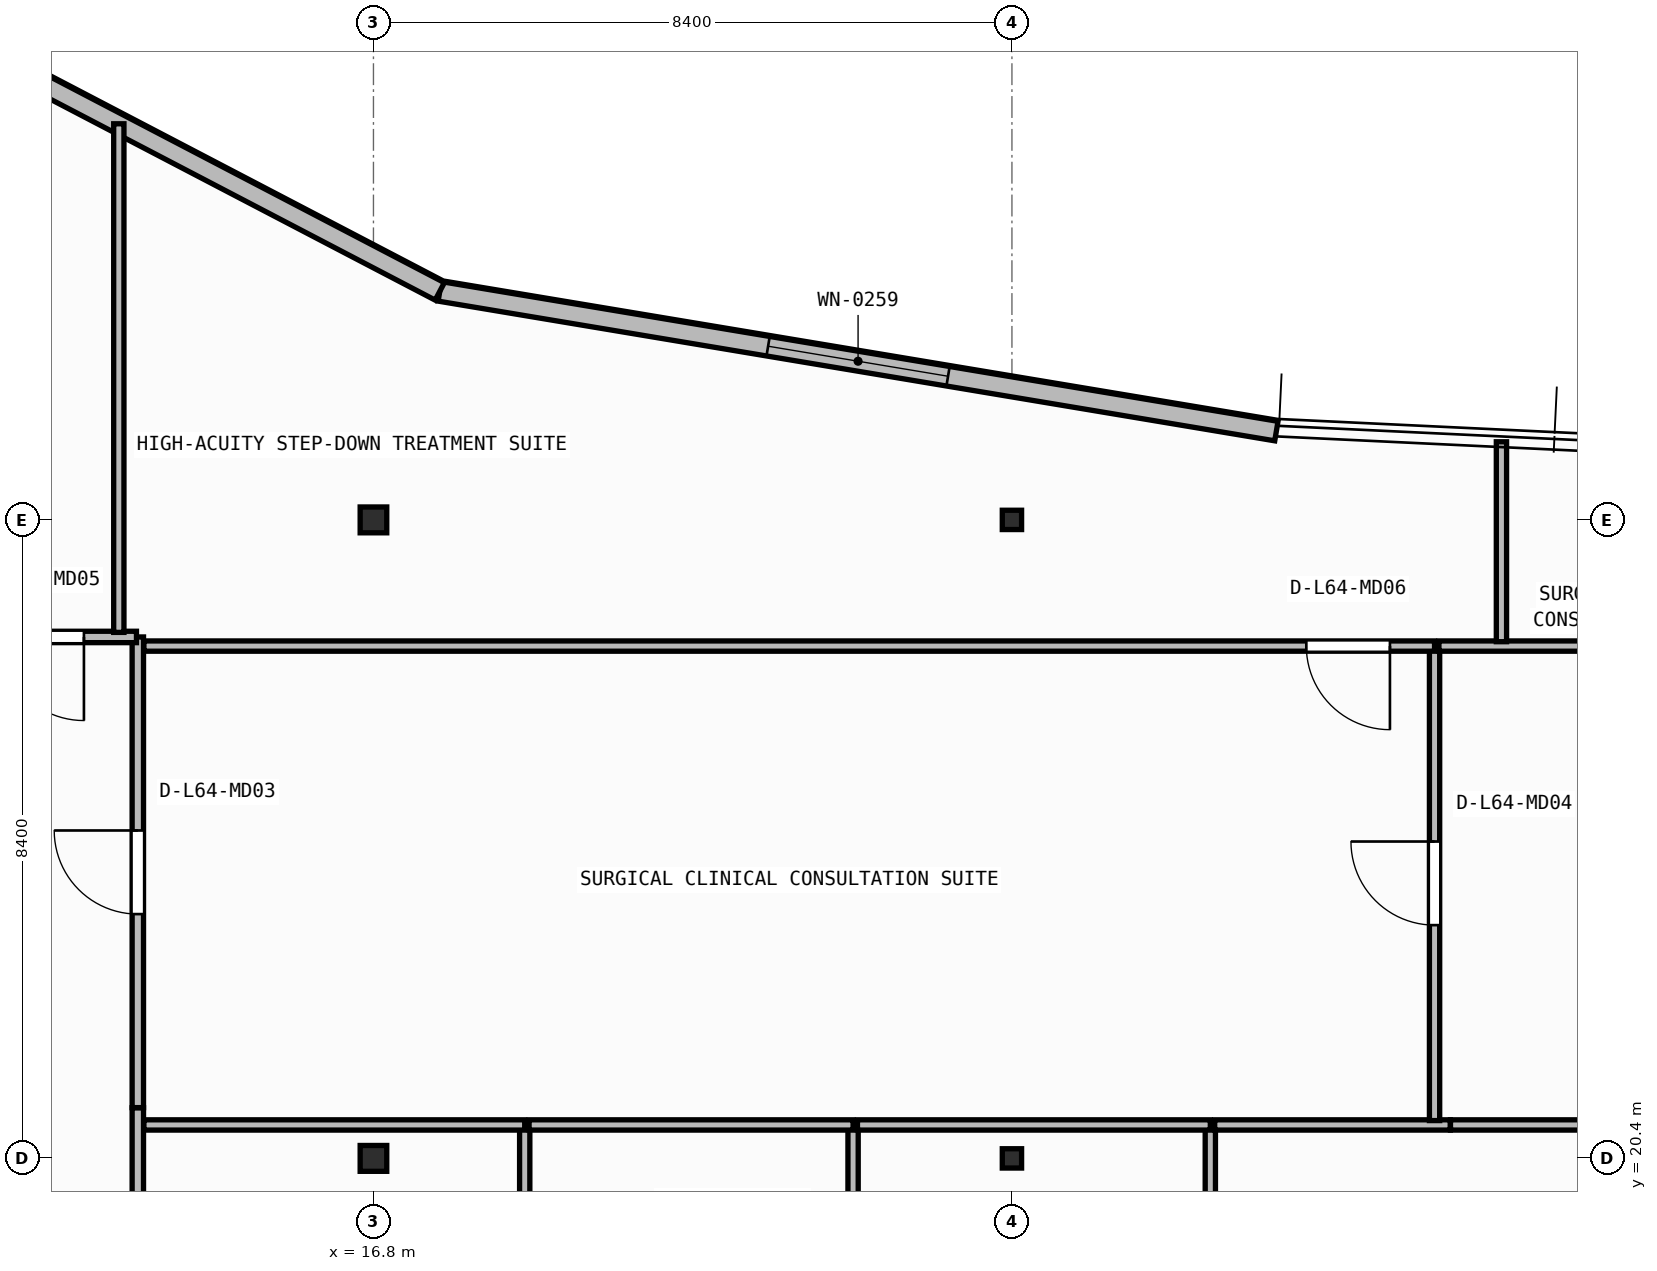
"""IFC4 building model, lengths in metres.
Left out: names, types, materials, properties, quantities, classifications, styles, units other than length and angle.
Written with IfcOpenShell. Run it as: python <this file> out.ifc"""

import sys

from ifc_helpers import new_model, si_unit, direction, frame, frame_2d, origin, origin_2d, place, context, subcontext, project, spatial, rectangle, i_section, extrude, element, fill, save


model = new_model("IFC4")
c1 = context("Model", 3, precision=1e-05, world=origin(), true_north=direction((0.0, 1.0)))
c2 = subcontext(c1, "Body", "Model", "MODEL_VIEW")
j1 = project(units=[si_unit("LENGTHUNIT", "METRE"), si_unit("PLANEANGLEUNIT", "RADIAN")], contexts=[c1])
p1 = place(None, origin())
s1 = spatial("IfcSite", under=j1, at=p1, CompositionType="ELEMENT")
p2 = place(p1, origin())
s2 = spatial("IfcBuilding", under=s1, at=p2, CompositionType="ELEMENT")
p3 = place(p2, frame((0.0, 0.0, 260.5)))
s3 = spatial("IfcBuildingStorey", under=s2, at=p3, CompositionType="ELEMENT", Elevation=260.5)
p4 = place(p3, frame((16.8, 20.4, 0.0), z_axis=(0.0, 0.0, 1.0), x_axis=(1.0, 0.0, 0.0)))
e1 = element("IfcColumn", 1, at=p4, inside=s3, PredefinedType="COLUMN", context=c2, shape_type="SweptSolid", body=[
    extrude(i_section(OverallWidth=0.35, OverallDepth=0.34, WebThickness=0.016, FlangeThickness=0.028, at=origin_2d()), origin(), (0.0, 0.0, 1.0), 3.95),
])
p5 = place(p3, frame((25.2, 20.4, 0.0), z_axis=(0.0, 0.0, 1.0), x_axis=(1.0, 0.0, 0.0)))
e2 = element("IfcColumn", 2, at=p5, inside=s3, PredefinedType="COLUMN", context=c2, shape_type="SweptSolid", body=[
    extrude(i_section(OverallWidth=0.254, OverallDepth=0.254, WebThickness=0.009, FlangeThickness=0.014, FilletRadius=0.013, at=origin_2d()), origin(), (0.0, 0.0, 1.0), 3.95),
])
p6 = place(p3, frame((16.8, 28.8, 0.0), z_axis=(0.0, 0.0, 1.0), x_axis=(1.0, 0.0, 0.0)))
e3 = element("IfcColumn", 3, at=p6, inside=s3, PredefinedType="COLUMN", context=c2, shape_type="SweptSolid", body=[
    extrude(i_section(OverallWidth=0.35, OverallDepth=0.34, WebThickness=0.016, FlangeThickness=0.028, at=origin_2d()), origin(), (0.0, 0.0, 1.0), 3.95),
])
p7 = place(p3, frame((25.2, 28.8, 0.0), z_axis=(0.0, 0.0, 1.0), x_axis=(1.0, 0.0, 0.0)))
e4 = element("IfcColumn", 4, at=p7, inside=s3, PredefinedType="COLUMN", context=c2, shape_type="SweptSolid", body=[
    extrude(i_section(OverallWidth=0.254, OverallDepth=0.254, WebThickness=0.009, FlangeThickness=0.014, FilletRadius=0.013, at=origin_2d()), origin(), (0.0, 0.0, 1.0), 3.95),
])
p8 = place(p3, frame((28.679, 29.969, 0.0), z_axis=(0.0, 0.0, 1.0), x_axis=(-0.986343023061, 0.164704100918, 0.0)))
e5 = element("IfcWall", 5, at=p8, inside=s3, PredefinedType="STANDARD", context=c2, shape_type="SweptSolid", body=[
    extrude(rectangle(XDim=11.159, YDim=0.26, at=frame_2d((5.579, 0.0))), origin(), (0.0, 0.0, 1.0), 3.71),
])
p9 = place(p8, frame((4.379, 0.0, 0.9)))
e6 = element("IfcOpeningElement", 6, at=p9, cuts=e5, PredefinedType="OPENING", context=c2, shape_type="SweptSolid", body=[
    extrude(rectangle(XDim=2.4, YDim=1.65, at=frame_2d((1.2, 0.825))), frame((0.0, 0.14, 0.0), z_axis=(0.0, -1.0, 0.0), x_axis=(1.0, 0.0, 0.0)), (0.0, 0.0, 1.0), 0.28),
])
p10 = place(p3, frame((17.673, 31.806, 0.0), z_axis=(0.0, 0.0, 1.0), x_axis=(-0.886426635565, 0.462869117311, 0.0)))
e7 = element("IfcWall", 7, at=p10, inside=s3, PredefinedType="STANDARD", context=c2, shape_type="SweptSolid", body=[
    extrude(rectangle(XDim=10.514, YDim=0.26, at=frame_2d((5.257, 0.0))), origin(), (0.0, 0.0, 1.0), 3.71),
])
p11 = place(p10, frame((6.449, 0.0, 0.9)))
e8 = element("IfcOpeningElement", 8, at=p11, cuts=e7, PredefinedType="OPENING", context=c2, shape_type="SweptSolid", body=[
    extrude(rectangle(XDim=2.4, YDim=1.65, at=frame_2d((1.2, 0.825))), frame((0.0, 0.14, 0.0), z_axis=(0.0, -1.0, 0.0), x_axis=(1.0, 0.0, 0.0)), (0.0, 0.0, 1.0), 0.28),
])
p12 = place(p3, frame((13.7, 17.814, 0.0), z_axis=(0.0, 0.0, 1.0), x_axis=(0.0, 1.0, 0.0)))
e9 = element("IfcWall", 9, at=p12, inside=s3, PredefinedType="PARTITIONING", context=c2, shape_type="SweptSolid", body=[
    extrude(rectangle(XDim=3.252, YDim=0.15, at=frame_2d((1.626, 0.0))), origin(), (0.0, 0.0, 1.0), 3.71),
])
p13 = place(p3, frame((13.7, 21.068, 0.0), z_axis=(0.0, 0.0, 1.0), x_axis=(0.0, 1.0, 0.0)))
e10 = element("IfcWall", 10, at=p13, inside=s3, PredefinedType="PARTITIONING", context=c2, shape_type="SweptSolid", body=[
    extrude(rectangle(XDim=6.192, YDim=0.15, at=frame_2d((3.096, 0.0))), origin(), (0.0, 0.0, 1.0), 3.71),
])
p14 = place(p13, frame((2.546, 0.0, 0.0)))
e11 = element("IfcOpeningElement", 11, at=p14, cuts=e10, PredefinedType="OPENING", context=c2, shape_type="SweptSolid", body=[
    extrude(rectangle(XDim=1.1, YDim=2.1, at=frame_2d((0.55, 1.05))), frame((0.0, 0.085, 0.0), z_axis=(0.0, -1.0, 0.0), x_axis=(1.0, 0.0, 0.0)), (0.0, 0.0, 1.0), 0.17),
])
p15 = place(p3, frame((13.682, 27.26, 0.0), z_axis=(0.0, 0.0, 1.0), x_axis=(-1.0, 0.0, 0.0)))
e12 = element("IfcWall", 12, at=p15, inside=s3, PredefinedType="PARTITIONING", context=c2, shape_type="SweptSolid", body=[
    extrude(rectangle(XDim=2.482, YDim=0.15, at=frame_2d((1.241, 0.0))), origin(), (0.0, 0.0, 1.0), 3.71),
])
p16 = place(p15, frame((0.691, 0.0, 0.0)))
e13 = element("IfcOpeningElement", 13, at=p16, cuts=e12, PredefinedType="OPENING", context=c2, shape_type="SweptSolid", body=[
    extrude(rectangle(XDim=1.1, YDim=2.1, at=frame_2d((0.55, 1.05))), frame((0.0, 0.085, 0.0), z_axis=(0.0, -1.0, 0.0), x_axis=(1.0, 0.0, 0.0)), (0.0, 0.0, 1.0), 0.17),
])
p17 = place(p3, frame((18.79, 17.833, 0.0), z_axis=(0.0, 0.0, 1.0), x_axis=(0.0, 1.0, 0.0)))
e14 = element("IfcWall", 14, at=p17, inside=s3, PredefinedType="PARTITIONING", context=c2, shape_type="SweptSolid", body=[
    extrude(rectangle(XDim=3.008, YDim=0.135, at=frame_2d((1.504, 0.0))), origin(), (0.0, 0.0, 1.0), 3.71),
])
p18 = place(p3, frame((18.79, 20.84, 0.0), z_axis=(0.0, 0.0, 1.0), x_axis=(-1.0, 0.0, 0.0)))
e15 = element("IfcWall", 15, at=p18, inside=s3, PredefinedType="PARTITIONING", context=c2, shape_type="SweptSolid", body=[
    extrude(rectangle(XDim=5.01, YDim=0.135, at=frame_2d((2.505, 0.0))), origin(), (0.0, 0.0, 1.0), 3.157),
])
p19 = place(p3, frame((23.11, 17.833, 0.0), z_axis=(0.0, 0.0, 1.0), x_axis=(0.0, 1.0, 0.0)))
e16 = element("IfcWall", 16, at=p19, inside=s3, PredefinedType="PARTITIONING", context=c2, shape_type="SweptSolid", body=[
    extrude(rectangle(XDim=3.008, YDim=0.135, at=frame_2d((1.504, 0.0))), origin(), (0.0, 0.0, 1.0), 3.71),
])
p20 = place(p3, frame((23.11, 20.84, 0.0), z_axis=(0.0, 0.0, 1.0), x_axis=(-1.0, 0.0, 0.0)))
e17 = element("IfcWall", 17, at=p20, inside=s3, PredefinedType="PARTITIONING", context=c2, shape_type="SweptSolid", body=[
    extrude(rectangle(XDim=4.263, YDim=0.135, at=frame_2d((2.131, 0.0))), origin(), (0.0, 0.0, 1.0), 3.157),
])
p21 = place(p3, frame((27.81, 17.833, 0.0), z_axis=(0.0, 0.0, 1.0), x_axis=(0.0, 1.0, 0.0)))
e18 = element("IfcWall", 18, at=p21, inside=s3, PredefinedType="PARTITIONING", context=c2, shape_type="SweptSolid", body=[
    extrude(rectangle(XDim=3.008, YDim=0.135, at=frame_2d((1.504, 0.0))), origin(), (0.0, 0.0, 1.0), 3.71),
])
p22 = place(p3, frame((27.81, 20.84, 0.0), z_axis=(0.0, 0.0, 1.0), x_axis=(-1.0, 0.0, 0.0)))
e19 = element("IfcWall", 19, at=p22, inside=s3, PredefinedType="PARTITIONING", context=c2, shape_type="SweptSolid", body=[
    extrude(rectangle(XDim=4.643, YDim=0.135, at=frame_2d((2.321, 0.0))), origin(), (0.0, 0.0, 1.0), 3.157),
])
p23 = place(p3, frame((30.968, 20.84, 0.0), z_axis=(0.0, 0.0, 1.0), x_axis=(-1.0, 0.0, 0.0)))
e20 = element("IfcWall", 20, at=p23, inside=s3, PredefinedType="PARTITIONING", context=c2, shape_type="SweptSolid", body=[
    extrude(rectangle(XDim=3.1, YDim=0.135, at=frame_2d((1.55, 0.0))), origin(), (0.0, 0.0, 1.0), 3.157),
])
p24 = place(p3, frame((32.88, 20.84, 0.0), z_axis=(0.0, 0.0, 1.0), x_axis=(-1.0, 0.0, 0.0)))
e21 = element("IfcWall", 21, at=p24, inside=s3, PredefinedType="PARTITIONING", context=c2, shape_type="SweptSolid", body=[
    extrude(rectangle(XDim=1.91, YDim=0.135, at=frame_2d((0.955, 0.0))), origin(), (0.0, 0.0, 1.0), 3.157),
])
p25 = place(p3, frame((30.76, 20.897, 0.0), z_axis=(0.0, 0.0, 1.0), x_axis=(0.0, 1.0, 0.0)))
e22 = element("IfcWall", 22, at=p25, inside=s3, PredefinedType="PARTITIONING", context=c2, shape_type="SweptSolid", body=[
    extrude(rectangle(XDim=6.242, YDim=0.135, at=frame_2d((3.121, 0.0))), origin(), (0.0, 0.0, 1.0), 3.71),
])
p26 = place(p25, frame((2.571, 0.0, 0.0)))
e23 = element("IfcOpeningElement", 23, at=p26, cuts=e22, PredefinedType="OPENING", context=c2, shape_type="SweptSolid", body=[
    extrude(rectangle(XDim=1.1, YDim=2.1, at=frame_2d((0.55, 1.05))), frame((0.0, 0.077, 0.0), z_axis=(0.0, -1.0, 0.0), x_axis=(1.0, 0.0, 0.0)), (0.0, 0.0, 1.0), 0.155),
])
p27 = place(p3, frame((30.76, 27.14, 0.0), z_axis=(0.0, 0.0, 1.0), x_axis=(-1.0, 0.0, 0.0)))
e24 = element("IfcWall", 24, at=p27, inside=s3, PredefinedType="PARTITIONING", context=c2, shape_type="SweptSolid", body=[
    extrude(rectangle(XDim=16.98, YDim=0.135, at=frame_2d((8.49, 0.0))), origin(), (0.0, 0.0, 1.0), 3.71),
])
p28 = place(p27, frame((0.587, 0.0, 0.0)))
e25 = element("IfcOpeningElement", 25, at=p28, cuts=e24, PredefinedType="OPENING", context=c2, shape_type="SweptSolid", body=[
    extrude(rectangle(XDim=1.1, YDim=2.1, at=frame_2d((0.55, 1.05))), frame((0.0, 0.077, 0.0), z_axis=(0.0, -1.0, 0.0), x_axis=(1.0, 0.0, 0.0)), (0.0, 0.0, 1.0), 0.155),
])
p29 = place(p3, frame((39.638, 27.14, 0.0), z_axis=(0.0, 0.0, 1.0), x_axis=(-1.0, 0.0, 0.0)))
e26 = element("IfcWall", 26, at=p29, inside=s3, PredefinedType="PARTITIONING", context=c2, shape_type="SweptSolid", body=[
    extrude(rectangle(XDim=8.821, YDim=0.135, at=frame_2d((4.41, 0.0))), origin(), (0.0, 0.0, 1.0), 3.71),
])
p30 = place(p29, frame((0.383, 0.0, 0.0)))
e27 = element("IfcOpeningElement", 27, at=p30, cuts=e26, PredefinedType="OPENING", context=c2, shape_type="SweptSolid", body=[
    extrude(rectangle(XDim=1.1, YDim=2.1, at=frame_2d((0.55, 1.05))), frame((0.0, 0.077, 0.0), z_axis=(0.0, -1.0, 0.0), x_axis=(1.0, 0.0, 0.0)), (0.0, 0.0, 1.0), 0.155),
])
p31 = place(p3, frame((13.45, 27.32, 0.0), z_axis=(0.0, 0.0, 1.0), x_axis=(0.0, 1.0, 0.0)))
e28 = element("IfcWall", 28, at=p31, inside=s3, PredefinedType="PARTITIONING", context=c2, shape_type="SweptSolid", body=[
    extrude(rectangle(XDim=6.691, YDim=0.135, at=frame_2d((3.346, 0.0))), origin(), (0.0, 0.0, 1.0), 3.71),
])
p32 = place(p3, frame((31.64, 27.198, 0.0), z_axis=(0.0, 0.0, 1.0), x_axis=(0.0, 1.0, 0.0)))
e29 = element("IfcWall", 29, at=p32, inside=s3, PredefinedType="PARTITIONING", context=c2, shape_type="SweptSolid", body=[
    extrude(rectangle(XDim=2.63, YDim=0.135, at=frame_2d((1.315, 0.0))), origin(), (0.0, 0.0, 1.0), 3.71),
])
p33 = place(p9, origin())
e30 = element("IfcWindow", 30, at=p33, inside=s3, PartitioningType="SINGLE_PANEL", PredefinedType="WINDOW", context=c2, shape_type="SweptSolid", body=[
    extrude(rectangle(XDim=2.4, YDim=1.65, at=frame_2d((1.2, 0.825))), frame((0.0, 0.03, 0.0), z_axis=(0.0, -1.0, 0.0), x_axis=(1.0, 0.0, 0.0)), (0.0, 0.0, 1.0), 0.06),
])
fill(e6, e30)
p34 = place(p14, origin())
e31 = element("IfcDoor", 31, at=p34, inside=s3, OperationType="SINGLE_SWING_RIGHT", PredefinedType="DOOR", context=c2, shape_type="SweptSolid", body=[
    extrude(rectangle(XDim=1.1, YDim=2.1, at=frame_2d((0.55, 1.05))), frame((0.0, 0.025, 0.0), z_axis=(0.0, -1.0, 0.0), x_axis=(1.0, 0.0, 0.0)), (0.0, 0.0, 1.0), 0.05),
])
fill(e11, e31)
p35 = place(p16, origin())
e32 = element("IfcDoor", 32, at=p35, inside=s3, OperationType="SINGLE_SWING_LEFT", PredefinedType="DOOR", context=c2, shape_type="SweptSolid", body=[
    extrude(rectangle(XDim=1.1, YDim=2.1, at=frame_2d((0.55, 1.05))), frame((0.0, 0.025, 0.0), z_axis=(0.0, -1.0, 0.0), x_axis=(1.0, 0.0, 0.0)), (0.0, 0.0, 1.0), 0.05),
])
fill(e13, e32)
p36 = place(p26, origin())
e33 = element("IfcDoor", 33, at=p36, inside=s3, OperationType="SINGLE_SWING_RIGHT", PredefinedType="DOOR", context=c2, shape_type="SweptSolid", body=[
    extrude(rectangle(XDim=1.1, YDim=2.1, at=frame_2d((0.55, 1.05))), frame((0.0, 0.025, 0.0), z_axis=(0.0, -1.0, 0.0), x_axis=(1.0, 0.0, 0.0)), (0.0, 0.0, 1.0), 0.05),
])
fill(e23, e33)
p37 = place(p28, origin())
e34 = element("IfcDoor", 34, at=p37, inside=s3, OperationType="SINGLE_SWING_LEFT", PredefinedType="DOOR", context=c2, shape_type="SweptSolid", body=[
    extrude(rectangle(XDim=1.1, YDim=2.1, at=frame_2d((0.55, 1.05))), frame((0.0, 0.025, 0.0), z_axis=(0.0, -1.0, 0.0), x_axis=(1.0, 0.0, 0.0)), (0.0, 0.0, 1.0), 0.05),
])
fill(e25, e34)
save(model, sys.argv[1])
